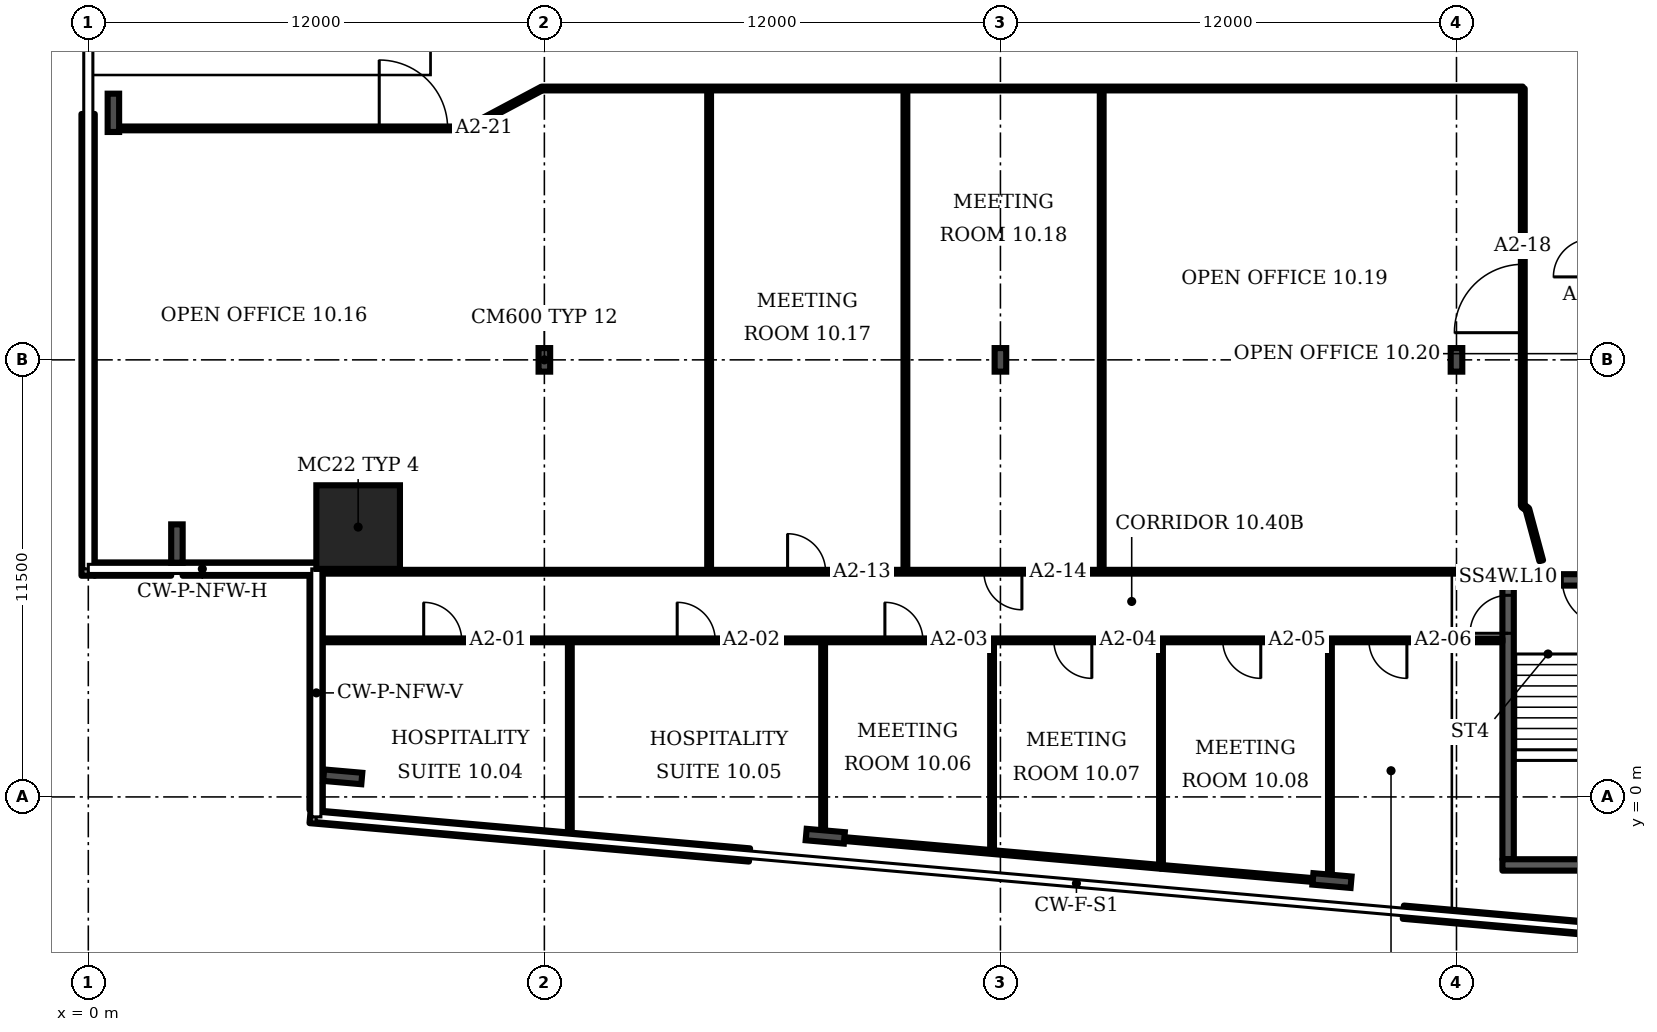
"""IFC4 building model, lengths in metres.
Left out: names, types, materials, properties, quantities, classifications, styles, units other than length and angle.
Written with IfcOpenShell. Run it as: python <this file> out.ifc"""

import sys

from ifc_helpers import new_model, si_unit, direction, frame, frame_2d, origin, origin_2d, place, context, subcontext, project, spatial, rectangle, i_section, extrude, element, fill, save


model = new_model("IFC4")
c1 = context("Model", 3, precision=1e-05, world=origin(), true_north=direction((0.0, 1.0)))
c2 = subcontext(c1, "Body", "Model", "MODEL_VIEW")
j1 = project(units=[si_unit("LENGTHUNIT", "METRE"), si_unit("PLANEANGLEUNIT", "RADIAN")], contexts=[c1])
p1 = place(None, origin())
s1 = spatial("IfcSite", under=j1, at=p1, CompositionType="ELEMENT")
p2 = place(p1, origin())
s2 = spatial("IfcBuilding", under=s1, at=p2, CompositionType="ELEMENT")
p3 = place(p2, frame((0.0, 0.0, 55.9)))
s3 = spatial("IfcBuildingStorey", under=s2, at=p3, CompositionType="ELEMENT", Elevation=55.9)
p4 = place(p3, frame((7.1, 7.1, 0.0), z_axis=(0.0, 0.0, 1.0), x_axis=(1.0, 0.0, 0.0)))
e1 = element("IfcColumn", 1, at=p4, inside=s3, PredefinedType="COLUMN", context=c2, shape_type="SweptSolid", body=[
    extrude(rectangle(XDim=2.2, YDim=2.2, at=origin_2d()), origin(), (0.0, 0.0, 1.0), 3.6),
])
for number, where, z_axis, x_axis in (
    (2, (6.694, 0.529, 0.0), (0.0, 0.0, 1.0), (-0.087, -0.996, 0.0)),
    (3, (19.391, -1.034, 0.0), (0.0, 0.0, 1.0), (-0.087, -0.996, 0.0)),
    (4, (32.724, -2.2, 0.0), (0.0, 0.0, 1.0), (-0.087, -0.996, 0.0)),
    (5, (0.66, 18.0, 0.0), (0.0, 0.0, 1.0), (-1.0, 0.0, 0.0)),
    (6, (2.332, 6.667, 0.0), (0.0, 0.0, 1.0), (-1.0, 0.0, 0.0)),
):
    element("IfcColumn", number, at=place(p3, frame(where, z_axis=z_axis, x_axis=x_axis)), inside=s3, PredefinedType="COLUMN", context=c2, shape_type="SweptSolid", body=[
        extrude(i_section(OverallWidth=0.302, OverallDepth=1.008, WebThickness=0.021, FlangeThickness=0.04, FilletRadius=0.03, at=origin_2d()), origin(), (0.0, 0.0, 1.0), 3.6),
    ])
for number, where, z_axis, x_axis in (
    (7, (12.0, 11.5, 0.0), (0.0, 0.0, 1.0), (1.0, 0.0, 0.0)),
    (8, (24.0, 11.5, 0.0), (0.0, 0.0, 1.0), (1.0, 0.0, 0.0)),
    (9, (36.0, 11.5, 0.0), (0.0, 0.0, 1.0), (1.0, 0.0, 0.0)),
):
    element("IfcColumn", number, at=place(p3, frame(where, z_axis=z_axis, x_axis=x_axis)), inside=s3, PredefinedType="COLUMN", context=c2, shape_type="SweptSolid", body=[
        extrude(i_section(OverallWidth=0.305, OverallDepth=0.62, WebThickness=0.021, FlangeThickness=0.04, FilletRadius=0.027, at=origin_2d()), origin(), (0.0, 0.0, 1.0), 3.6),
    ])
p5 = place(p3, frame((5.835, -0.516, 0.0), z_axis=(0.0, 0.0, 1.0), x_axis=(0.996192, -0.087142, 0.0)))
e10 = element("IfcWall", 10, at=p5, inside=s3, PredefinedType="SOLIDWALL", context=c2, shape_type="SweptSolid", body=[
    extrude(rectangle(XDim=11.607, YDim=0.35, at=frame_2d((5.804, 0.0))), origin(), (0.0, 0.0, 1.0), 1.0),
])
p6 = place(p3, frame((34.601, -3.032, 0.0), z_axis=(0.0, 0.0, 1.0), x_axis=(0.996193, -0.087148, 0.0)))
e11 = element("IfcWall", 11, at=p6, inside=s3, PredefinedType="SOLIDWALL", context=c2, shape_type="SweptSolid", body=[
    extrude(rectangle(XDim=11.458, YDim=0.35, at=frame_2d((5.729, 0.0))), origin(), (0.0, 0.0, 1.0), 1.0),
])
p7 = place(p3, frame((-0.005, 17.97, 0.0), z_axis=(0.0, 0.0, 1.0), x_axis=(0.0, -1.0, 0.0)))
e12 = element("IfcWall", 12, at=p7, inside=s3, PredefinedType="SOLIDWALL", context=c2, shape_type="SweptSolid", body=[
    extrude(rectangle(XDim=12.15, YDim=0.35, at=frame_2d((6.075, 0.0))), origin(), (0.0, 0.0, 1.0), 1.0),
])
p8 = place(p3, frame((0.17, 5.995, 0.0), z_axis=(0.0, 0.0, 1.0), x_axis=(1.0, 0.0, 0.0)))
e13 = element("IfcWall", 13, at=p8, inside=s3, PredefinedType="SOLIDWALL", context=c2, shape_type="SweptSolid", body=[
    extrude(rectangle(XDim=2.011, YDim=0.35, at=frame_2d((1.005, 0.0))), origin(), (0.0, 0.0, 1.0), 1.0),
])
p9 = place(p3, frame((2.483, 5.995, 0.0), z_axis=(0.0, 0.0, 1.0), x_axis=(1.0, 0.0, 0.0)))
e14 = element("IfcWall", 14, at=p9, inside=s3, PredefinedType="SOLIDWALL", context=c2, shape_type="SweptSolid", body=[
    extrude(rectangle(XDim=3.517, YDim=0.35, at=frame_2d((1.759, 0.0))), origin(), (0.0, 0.0, 1.0), 1.0),
])
p10 = place(p3, frame((5.995, 5.82, 0.0), z_axis=(0.0, 0.0, 1.0), x_axis=(0.0, -1.0, 0.0)))
e15 = element("IfcWall", 15, at=p10, inside=s3, PredefinedType="SOLIDWALL", context=c2, shape_type="SweptSolid", body=[
    extrude(rectangle(XDim=6.161, YDim=0.35, at=frame_2d((3.081, 0.0))), origin(), (0.0, 0.0, 1.0), 1.0),
])
p11 = place(p3, frame((37.208, 5.711, 0.0), z_axis=(0.0, 0.0, 1.0), x_axis=(1.0, 0.0, 0.0)))
e16 = element("IfcWall", 16, at=p11, inside=s3, PredefinedType="SHEAR", context=c2, shape_type="SweptSolid", body=[
    extrude(rectangle(XDim=4.35, YDim=0.3, at=frame_2d((2.175, 0.0))), origin(), (0.0, 0.0, 1.0), 3.2),
])
p12 = place(p11, frame((1.575, 0.0, 0.0)))
e17 = element("IfcOpeningElement", 17, at=p12, cuts=e16, PredefinedType="OPENING", context=c2, shape_type="SweptSolid", body=[
    extrude(rectangle(XDim=1.2, YDim=2.1, at=frame_2d((0.6, 1.05))), frame((0.0, 0.16, 0.0), z_axis=(0.0, -1.0, 0.0), x_axis=(1.0, 0.0, 0.0)), (0.0, 0.0, 1.0), 0.32),
])
p13 = place(p3, frame((37.358, -1.639, 0.0), z_axis=(0.0, 0.0, 1.0), x_axis=(0.0, 1.0, 0.0)))
e18 = element("IfcWall", 18, at=p13, inside=s3, PredefinedType="SHEAR", context=c2, shape_type="SweptSolid", body=[
    extrude(rectangle(XDim=7.2, YDim=0.3, at=frame_2d((3.6, 0.0))), origin(), (0.0, 0.0, 1.0), 3.2),
])
p14 = place(p13, frame((5.945, 0.0, 0.0)))
e19 = element("IfcOpeningElement", 19, at=p14, cuts=e18, PredefinedType="OPENING", context=c2, shape_type="SweptSolid", body=[
    extrude(rectangle(XDim=1.0, YDim=2.1, at=frame_2d((0.5, 1.05))), frame((0.0, 0.16, 0.0), z_axis=(0.0, -1.0, 0.0), x_axis=(1.0, 0.0, 0.0)), (0.0, 0.0, 1.0), 0.32),
])
p15 = place(p3, frame((0.63, 17.59, 0.0), z_axis=(0.0, 0.0, 1.0), x_axis=(1.0, 0.0, 0.0)))
e20 = element("IfcWall", 20, at=p15, inside=s3, PredefinedType="PARTITIONING", context=c2, shape_type="SweptSolid", body=[
    extrude(rectangle(XDim=9.55, YDim=0.1, at=frame_2d((4.775, 0.0))), origin(), (0.0, 0.0, 1.0), 3.2),
])
p16 = place(p15, frame((7.025, 0.0, 0.0)))
e21 = element("IfcOpeningElement", 21, at=p16, cuts=e20, PredefinedType="OPENING", context=c2, shape_type="SweptSolid", body=[
    extrude(rectangle(XDim=1.8, YDim=2.1, at=frame_2d((0.9, 1.05))), frame((0.0, 0.06, 0.0), z_axis=(0.0, -1.0, 0.0), x_axis=(1.0, 0.0, 0.0)), (0.0, 0.0, 1.0), 0.12),
])
p17 = place(p3, frame((6.02, 4.12, 0.0), z_axis=(0.0, 0.0, 1.0), x_axis=(1.0, 0.0, 0.0)))
e22 = element("IfcWall", 22, at=p17, inside=s3, PredefinedType="PARTITIONING", context=c2, shape_type="SweptSolid", body=[
    extrude(rectangle(XDim=31.188, YDim=0.1, at=frame_2d((15.594, 0.0))), origin(), (0.0, 0.0, 1.0), 3.2),
])
p18 = place(p17, frame((2.805, 0.0, 0.0)))
e23 = element("IfcOpeningElement", 23, at=p18, cuts=e22, PredefinedType="OPENING", context=c2, shape_type="SweptSolid", body=[
    extrude(rectangle(XDim=1.0, YDim=2.1, at=frame_2d((0.5, 1.05))), frame((0.0, 0.06, 0.0), z_axis=(0.0, -1.0, 0.0), x_axis=(1.0, 0.0, 0.0)), (0.0, 0.0, 1.0), 0.12),
])
p19 = place(p17, frame((9.475, 0.0, 0.0)))
e24 = element("IfcOpeningElement", 24, at=p19, cuts=e22, PredefinedType="OPENING", context=c2, shape_type="SweptSolid", body=[
    extrude(rectangle(XDim=1.0, YDim=2.1, at=frame_2d((0.5, 1.05))), frame((0.0, 0.06, 0.0), z_axis=(0.0, -1.0, 0.0), x_axis=(1.0, 0.0, 0.0)), (0.0, 0.0, 1.0), 0.12),
])
p20 = place(p17, frame((14.94, 0.0, 0.0)))
e25 = element("IfcOpeningElement", 25, at=p20, cuts=e22, PredefinedType="OPENING", context=c2, shape_type="SweptSolid", body=[
    extrude(rectangle(XDim=1.0, YDim=2.1, at=frame_2d((0.5, 1.05))), frame((0.0, 0.06, 0.0), z_axis=(0.0, -1.0, 0.0), x_axis=(1.0, 0.0, 0.0)), (0.0, 0.0, 1.0), 0.12),
])
p21 = place(p17, frame((19.385, 0.0, 0.0)))
e26 = element("IfcOpeningElement", 26, at=p21, cuts=e22, PredefinedType="OPENING", context=c2, shape_type="SweptSolid", body=[
    extrude(rectangle(XDim=1.0, YDim=2.1, at=frame_2d((0.5, 1.05))), frame((0.0, 0.06, 0.0), z_axis=(0.0, -1.0, 0.0), x_axis=(1.0, 0.0, 0.0)), (0.0, 0.0, 1.0), 0.12),
])
p22 = place(p17, frame((23.83, 0.0, 0.0)))
e27 = element("IfcOpeningElement", 27, at=p22, cuts=e22, PredefinedType="OPENING", context=c2, shape_type="SweptSolid", body=[
    extrude(rectangle(XDim=1.0, YDim=2.1, at=frame_2d((0.5, 1.05))), frame((0.0, 0.06, 0.0), z_axis=(0.0, -1.0, 0.0), x_axis=(1.0, 0.0, 0.0)), (0.0, 0.0, 1.0), 0.12),
])
p23 = place(p17, frame((27.675, 0.0, 0.0)))
e28 = element("IfcOpeningElement", 28, at=p23, cuts=e22, PredefinedType="OPENING", context=c2, shape_type="SweptSolid", body=[
    extrude(rectangle(XDim=1.0, YDim=2.1, at=frame_2d((0.5, 1.05))), frame((0.0, 0.06, 0.0), z_axis=(0.0, -1.0, 0.0), x_axis=(1.0, 0.0, 0.0)), (0.0, 0.0, 1.0), 0.12),
])
p24 = place(p3, frame((6.02, 5.925, 0.0), z_axis=(0.0, 0.0, 1.0), x_axis=(1.0, 0.0, 0.0)))
e29 = element("IfcWall", 29, at=p24, inside=s3, PredefinedType="PARTITIONING", context=c2, shape_type="SweptSolid", body=[
    extrude(rectangle(XDim=32.21, YDim=0.1, at=frame_2d((16.105, 0.0))), origin(), (0.0, 0.0, 1.0), 3.2),
])
p25 = place(p24, frame((12.38, 0.0, 0.0)))
e30 = element("IfcOpeningElement", 30, at=p25, cuts=e29, PredefinedType="OPENING", context=c2, shape_type="SweptSolid", body=[
    extrude(rectangle(XDim=1.0, YDim=2.1, at=frame_2d((0.5, 1.05))), frame((0.0, 0.06, 0.0), z_axis=(0.0, -1.0, 0.0), x_axis=(1.0, 0.0, 0.0)), (0.0, 0.0, 1.0), 0.12),
])
p26 = place(p24, frame((17.545, 0.0, 0.0)))
e31 = element("IfcOpeningElement", 31, at=p26, cuts=e29, PredefinedType="OPENING", context=c2, shape_type="SweptSolid", body=[
    extrude(rectangle(XDim=1.0, YDim=2.1, at=frame_2d((0.5, 1.05))), frame((0.0, 0.06, 0.0), z_axis=(0.0, -1.0, 0.0), x_axis=(1.0, 0.0, 0.0)), (0.0, 0.0, 1.0), 0.12),
])
p27 = place(p3, frame((10.18, 17.59, 0.0), z_axis=(0.0, 0.0, 1.0), x_axis=(0.435266, 0.900306, 0.0)))
e32 = element("IfcWall", 32, at=p27, inside=s3, PredefinedType="PARTITIONING", context=c2, shape_type="SweptSolid", body=[
    extrude(rectangle(XDim=0.172, YDim=0.1, at=frame_2d((0.086, 0.0))), origin(), (0.0, 0.0, 1.0), 3.2),
])
p28 = place(p3, frame((10.255, 17.745, 0.0), z_axis=(0.0, 0.0, 1.0), x_axis=(0.882644, 0.470051, 0.0)))
e33 = element("IfcWall", 33, at=p28, inside=s3, PredefinedType="PARTITIONING", context=c2, shape_type="SweptSolid", body=[
    extrude(rectangle(XDim=1.904, YDim=0.1, at=frame_2d((0.952, 0.0))), origin(), (0.0, 0.0, 1.0), 3.2),
])
p29 = place(p3, frame((11.935, 18.64, 0.0), z_axis=(0.0, 0.0, 1.0), x_axis=(1.0, 0.0, 0.0)))
e34 = element("IfcWall", 34, at=p29, inside=s3, PredefinedType="PARTITIONING", context=c2, shape_type="SweptSolid", body=[
    extrude(rectangle(XDim=25.81, YDim=0.1, at=frame_2d((12.905, 0.0))), origin(), (0.0, 0.0, 1.0), 3.2),
])
p30 = place(p3, frame((12.67, -1.088, 0.0), z_axis=(0.0, 0.0, 1.0), x_axis=(0.0, 1.0, 0.0)))
e35 = element("IfcWall", 35, at=p30, inside=s3, PredefinedType="PARTITIONING", context=c2, shape_type="SweptSolid", body=[
    extrude(rectangle(XDim=5.208, YDim=0.1, at=frame_2d((2.604, 0.0))), origin(), (0.0, 0.0, 1.0), 3.2),
])
p31 = place(p3, frame((16.335, 5.925, 0.0), z_axis=(0.0, 0.0, 1.0), x_axis=(0.0, 1.0, 0.0)))
e36 = element("IfcWall", 36, at=p31, inside=s3, PredefinedType="PARTITIONING", context=c2, shape_type="SweptSolid", body=[
    extrude(rectangle(XDim=12.715, YDim=0.1, at=frame_2d((6.357, 0.0))), origin(), (0.0, 0.0, 1.0), 3.2),
])
p32 = place(p3, frame((19.335, -1.06, 0.0), z_axis=(0.0, 0.0, 1.0), x_axis=(0.0, 1.0, 0.0)))
e37 = element("IfcWall", 37, at=p32, inside=s3, PredefinedType="PARTITIONING", context=c2, shape_type="SweptSolid", body=[
    extrude(rectangle(XDim=5.18, YDim=0.1, at=frame_2d((2.59, 0.0))), origin(), (0.0, 0.0, 1.0), 3.2),
])
p33 = place(p3, frame((21.5, 5.925, 0.0), z_axis=(0.0, 0.0, 1.0), x_axis=(0.0, 1.0, 0.0)))
e38 = element("IfcWall", 38, at=p33, inside=s3, PredefinedType="PARTITIONING", context=c2, shape_type="SweptSolid", body=[
    extrude(rectangle(XDim=12.715, YDim=0.1, at=frame_2d((6.357, 0.0))), origin(), (0.0, 0.0, 1.0), 3.2),
])
p34 = place(p3, frame((23.78, -1.45, 0.0), z_axis=(0.0, 0.0, 1.0), x_axis=(0.0, 1.0, 0.0)))
e39 = element("IfcWall", 39, at=p34, inside=s3, PredefinedType="PARTITIONING", context=c2, shape_type="SweptSolid", body=[
    extrude(rectangle(XDim=5.57, YDim=0.1, at=frame_2d((2.785, 0.0))), origin(), (0.0, 0.0, 1.0), 3.2),
])
p35 = place(p3, frame((26.665, 5.925, 0.0), z_axis=(0.0, 0.0, 1.0), x_axis=(0.0, 1.0, 0.0)))
e40 = element("IfcWall", 40, at=p35, inside=s3, PredefinedType="PARTITIONING", context=c2, shape_type="SweptSolid", body=[
    extrude(rectangle(XDim=12.715, YDim=0.1, at=frame_2d((6.357, 0.0))), origin(), (0.0, 0.0, 1.0), 3.2),
])
p36 = place(p3, frame((28.22, -1.84, 0.0), z_axis=(0.0, 0.0, 1.0), x_axis=(-0.996164, 0.087512, 0.0)))
e41 = element("IfcWall", 41, at=p36, inside=s3, PredefinedType="PARTITIONING", context=c2, shape_type="SweptSolid", body=[
    extrude(rectangle(XDim=8.919, YDim=0.1, at=frame_2d((4.459, 0.0))), origin(), (0.0, 0.0, 1.0), 2.58),
])
p37 = place(p3, frame((28.225, -1.84, 0.0), z_axis=(0.0, 0.0, 1.0), x_axis=(0.0, 1.0, 0.0)))
e42 = element("IfcWall", 42, at=p37, inside=s3, PredefinedType="PARTITIONING", context=c2, shape_type="SweptSolid", body=[
    extrude(rectangle(XDim=5.96, YDim=0.1, at=frame_2d((2.98, 0.0))), origin(), (0.0, 0.0, 1.0), 3.2),
])
p38 = place(p3, frame((32.665, -2.225, 0.0), z_axis=(0.0, 0.0, 1.0), x_axis=(-0.996263, 0.086391, 0.0)))
e43 = element("IfcWall", 43, at=p38, inside=s3, PredefinedType="PARTITIONING", context=c2, shape_type="SweptSolid", body=[
    extrude(rectangle(XDim=4.457, YDim=0.1, at=frame_2d((2.228, 0.0))), origin(), (0.0, 0.0, 1.0), 2.58),
])
p39 = place(p3, frame((32.67, -2.225, 0.0), z_axis=(0.0, 0.0, 1.0), x_axis=(0.0, 1.0, 0.0)))
e44 = element("IfcWall", 44, at=p39, inside=s3, PredefinedType="PARTITIONING", context=c2, shape_type="SweptSolid", body=[
    extrude(rectangle(XDim=6.345, YDim=0.1, at=frame_2d((3.173, 0.0))), origin(), (0.0, 0.0, 1.0), 3.2),
])
p40 = place(p3, frame((37.745, 7.66, 0.0), z_axis=(0.0, 0.0, 1.0), x_axis=(0.0, 1.0, 0.0)))
e45 = element("IfcWall", 45, at=p40, inside=s3, PredefinedType="PARTITIONING", context=c2, shape_type="SweptSolid", body=[
    extrude(rectangle(XDim=10.98, YDim=0.1, at=frame_2d((5.49, 0.0))), origin(), (0.0, 0.0, 1.0), 3.2),
])
p41 = place(p40, frame((4.555, 0.0, 0.0)))
e46 = element("IfcOpeningElement", 46, at=p41, cuts=e45, PredefinedType="OPENING", context=c2, shape_type="SweptSolid", body=[
    extrude(rectangle(XDim=1.8, YDim=2.1, at=frame_2d((0.9, 1.05))), frame((0.0, 0.06, 0.0), z_axis=(0.0, -1.0, 0.0), x_axis=(1.0, 0.0, 0.0)), (0.0, 0.0, 1.0), 0.12),
])
p42 = place(p3, frame((37.865, 7.57, 0.0), z_axis=(0.0, 0.0, 1.0), x_axis=(-0.800198, 0.599741, 0.0)))
e47 = element("IfcWall", 47, at=p42, inside=s3, PredefinedType="PARTITIONING", context=c2, shape_type="SweptSolid", body=[
    extrude(rectangle(XDim=0.15, YDim=0.1, at=frame_2d((0.075, 0.0))), origin(), (0.0, 0.0, 1.0), 3.2),
])
p43 = place(p3, frame((38.23, 6.215, 0.0), z_axis=(0.0, 0.0, 1.0), x_axis=(-0.260099, 0.965585, 0.0)))
e48 = element("IfcWall", 48, at=p43, inside=s3, PredefinedType="PARTITIONING", context=c2, shape_type="SweptSolid", body=[
    extrude(rectangle(XDim=1.403, YDim=0.1, at=frame_2d((0.702, 0.0))), origin(), (0.0, 0.0, 1.0), 3.2),
])
p44 = place(p3, frame((37.208, -1.789, 0.0), z_axis=(0.0, 0.0, 1.0), x_axis=(1.0, 0.0, 0.0)))
e49 = element("IfcWall", 49, at=p44, inside=s3, PredefinedType="SHEAR", context=c2, shape_type="SweptSolid", body=[
    extrude(rectangle(XDim=4.35, YDim=0.3, at=frame_2d((2.175, 0.0))), origin(), (0.0, 0.0, 1.0), 3.2),
])
p45 = place(p14, origin())
e50 = element("IfcDoor", 50, at=p45, inside=s3, OperationType="SINGLE_SWING_LEFT", PredefinedType="DOOR", context=c2, shape_type="SweptSolid", body=[
    extrude(rectangle(XDim=1.0, YDim=2.1, at=frame_2d((0.5, 1.05))), frame((0.0, 0.025, 0.0), z_axis=(0.0, -1.0, 0.0), x_axis=(1.0, 0.0, 0.0)), (0.0, 0.0, 1.0), 0.05),
])
fill(e19, e50)
p46 = place(p12, origin())
e51 = element("IfcDoor", 51, at=p46, inside=s3, OperationType="SINGLE_SWING_RIGHT", PredefinedType="DOOR", context=c2, shape_type="SweptSolid", body=[
    extrude(rectangle(XDim=1.2, YDim=2.1, at=frame_2d((0.6, 1.05))), frame((0.0, 0.025, 0.0), z_axis=(0.0, -1.0, 0.0), x_axis=(1.0, 0.0, 0.0)), (0.0, 0.0, 1.0), 0.05),
])
fill(e17, e51)
p47 = place(p18, origin())
e52 = element("IfcDoor", 52, at=p47, inside=s3, OperationType="SINGLE_SWING_LEFT", PredefinedType="DOOR", context=c2, shape_type="SweptSolid", body=[
    extrude(rectangle(XDim=1.0, YDim=2.1, at=frame_2d((0.5, 1.05))), frame((0.0, 0.025, 0.0), z_axis=(0.0, -1.0, 0.0), x_axis=(1.0, 0.0, 0.0)), (0.0, 0.0, 1.0), 0.05),
])
fill(e23, e52)
p48 = place(p19, origin())
e53 = element("IfcDoor", 53, at=p48, inside=s3, OperationType="SINGLE_SWING_LEFT", PredefinedType="DOOR", context=c2, shape_type="SweptSolid", body=[
    extrude(rectangle(XDim=1.0, YDim=2.1, at=frame_2d((0.5, 1.05))), frame((0.0, 0.025, 0.0), z_axis=(0.0, -1.0, 0.0), x_axis=(1.0, 0.0, 0.0)), (0.0, 0.0, 1.0), 0.05),
])
fill(e24, e53)
p49 = place(p20, origin())
e54 = element("IfcDoor", 54, at=p49, inside=s3, OperationType="SINGLE_SWING_LEFT", PredefinedType="DOOR", context=c2, shape_type="SweptSolid", body=[
    extrude(rectangle(XDim=1.0, YDim=2.1, at=frame_2d((0.5, 1.05))), frame((0.0, 0.025, 0.0), z_axis=(0.0, -1.0, 0.0), x_axis=(1.0, 0.0, 0.0)), (0.0, 0.0, 1.0), 0.05),
])
fill(e25, e54)
p50 = place(p21, origin())
e55 = element("IfcDoor", 55, at=p50, inside=s3, OperationType="SINGLE_SWING_RIGHT", PredefinedType="DOOR", context=c2, shape_type="SweptSolid", body=[
    extrude(rectangle(XDim=1.0, YDim=2.1, at=frame_2d((0.5, 1.05))), frame((0.0, 0.025, 0.0), z_axis=(0.0, -1.0, 0.0), x_axis=(1.0, 0.0, 0.0)), (0.0, 0.0, 1.0), 0.05),
])
fill(e26, e55)
p51 = place(p22, origin())
e56 = element("IfcDoor", 56, at=p51, inside=s3, OperationType="SINGLE_SWING_RIGHT", PredefinedType="DOOR", context=c2, shape_type="SweptSolid", body=[
    extrude(rectangle(XDim=1.0, YDim=2.1, at=frame_2d((0.5, 1.05))), frame((0.0, 0.025, 0.0), z_axis=(0.0, -1.0, 0.0), x_axis=(1.0, 0.0, 0.0)), (0.0, 0.0, 1.0), 0.05),
])
fill(e27, e56)
p52 = place(p23, origin())
e57 = element("IfcDoor", 57, at=p52, inside=s3, OperationType="SINGLE_SWING_RIGHT", PredefinedType="DOOR", context=c2, shape_type="SweptSolid", body=[
    extrude(rectangle(XDim=1.0, YDim=2.1, at=frame_2d((0.5, 1.05))), frame((0.0, 0.025, 0.0), z_axis=(0.0, -1.0, 0.0), x_axis=(1.0, 0.0, 0.0)), (0.0, 0.0, 1.0), 0.05),
])
fill(e28, e57)
p53 = place(p25, origin())
e58 = element("IfcDoor", 58, at=p53, inside=s3, OperationType="SINGLE_SWING_LEFT", PredefinedType="DOOR", context=c2, shape_type="SweptSolid", body=[
    extrude(rectangle(XDim=1.0, YDim=2.1, at=frame_2d((0.5, 1.05))), frame((0.0, 0.025, 0.0), z_axis=(0.0, -1.0, 0.0), x_axis=(1.0, 0.0, 0.0)), (0.0, 0.0, 1.0), 0.05),
])
fill(e30, e58)
p54 = place(p26, origin())
e59 = element("IfcDoor", 59, at=p54, inside=s3, OperationType="SINGLE_SWING_RIGHT", PredefinedType="DOOR", context=c2, shape_type="SweptSolid", body=[
    extrude(rectangle(XDim=1.0, YDim=2.1, at=frame_2d((0.5, 1.05))), frame((0.0, 0.025, 0.0), z_axis=(0.0, -1.0, 0.0), x_axis=(1.0, 0.0, 0.0)), (0.0, 0.0, 1.0), 0.05),
])
fill(e31, e59)
p55 = place(p41, origin())
e60 = element("IfcDoor", 60, at=p55, inside=s3, OperationType="DOUBLE_DOOR_SINGLE_SWING", PredefinedType="DOOR", context=c2, shape_type="SweptSolid", body=[
    extrude(rectangle(XDim=1.8, YDim=2.1, at=frame_2d((0.9, 1.05))), frame((0.0, 0.025, 0.0), z_axis=(0.0, -1.0, 0.0), x_axis=(1.0, 0.0, 0.0)), (0.0, 0.0, 1.0), 0.05),
])
fill(e46, e60)
p56 = place(p16, origin())
e61 = element("IfcDoor", 61, at=p56, inside=s3, OperationType="DOUBLE_DOOR_SINGLE_SWING", PredefinedType="DOOR", context=c2, shape_type="SweptSolid", body=[
    extrude(rectangle(XDim=1.8, YDim=2.1, at=frame_2d((0.9, 1.05))), frame((0.0, 0.025, 0.0), z_axis=(0.0, -1.0, 0.0), x_axis=(1.0, 0.0, 0.0)), (0.0, 0.0, 1.0), 0.05),
])
fill(e21, e61)
save(model, sys.argv[1])
